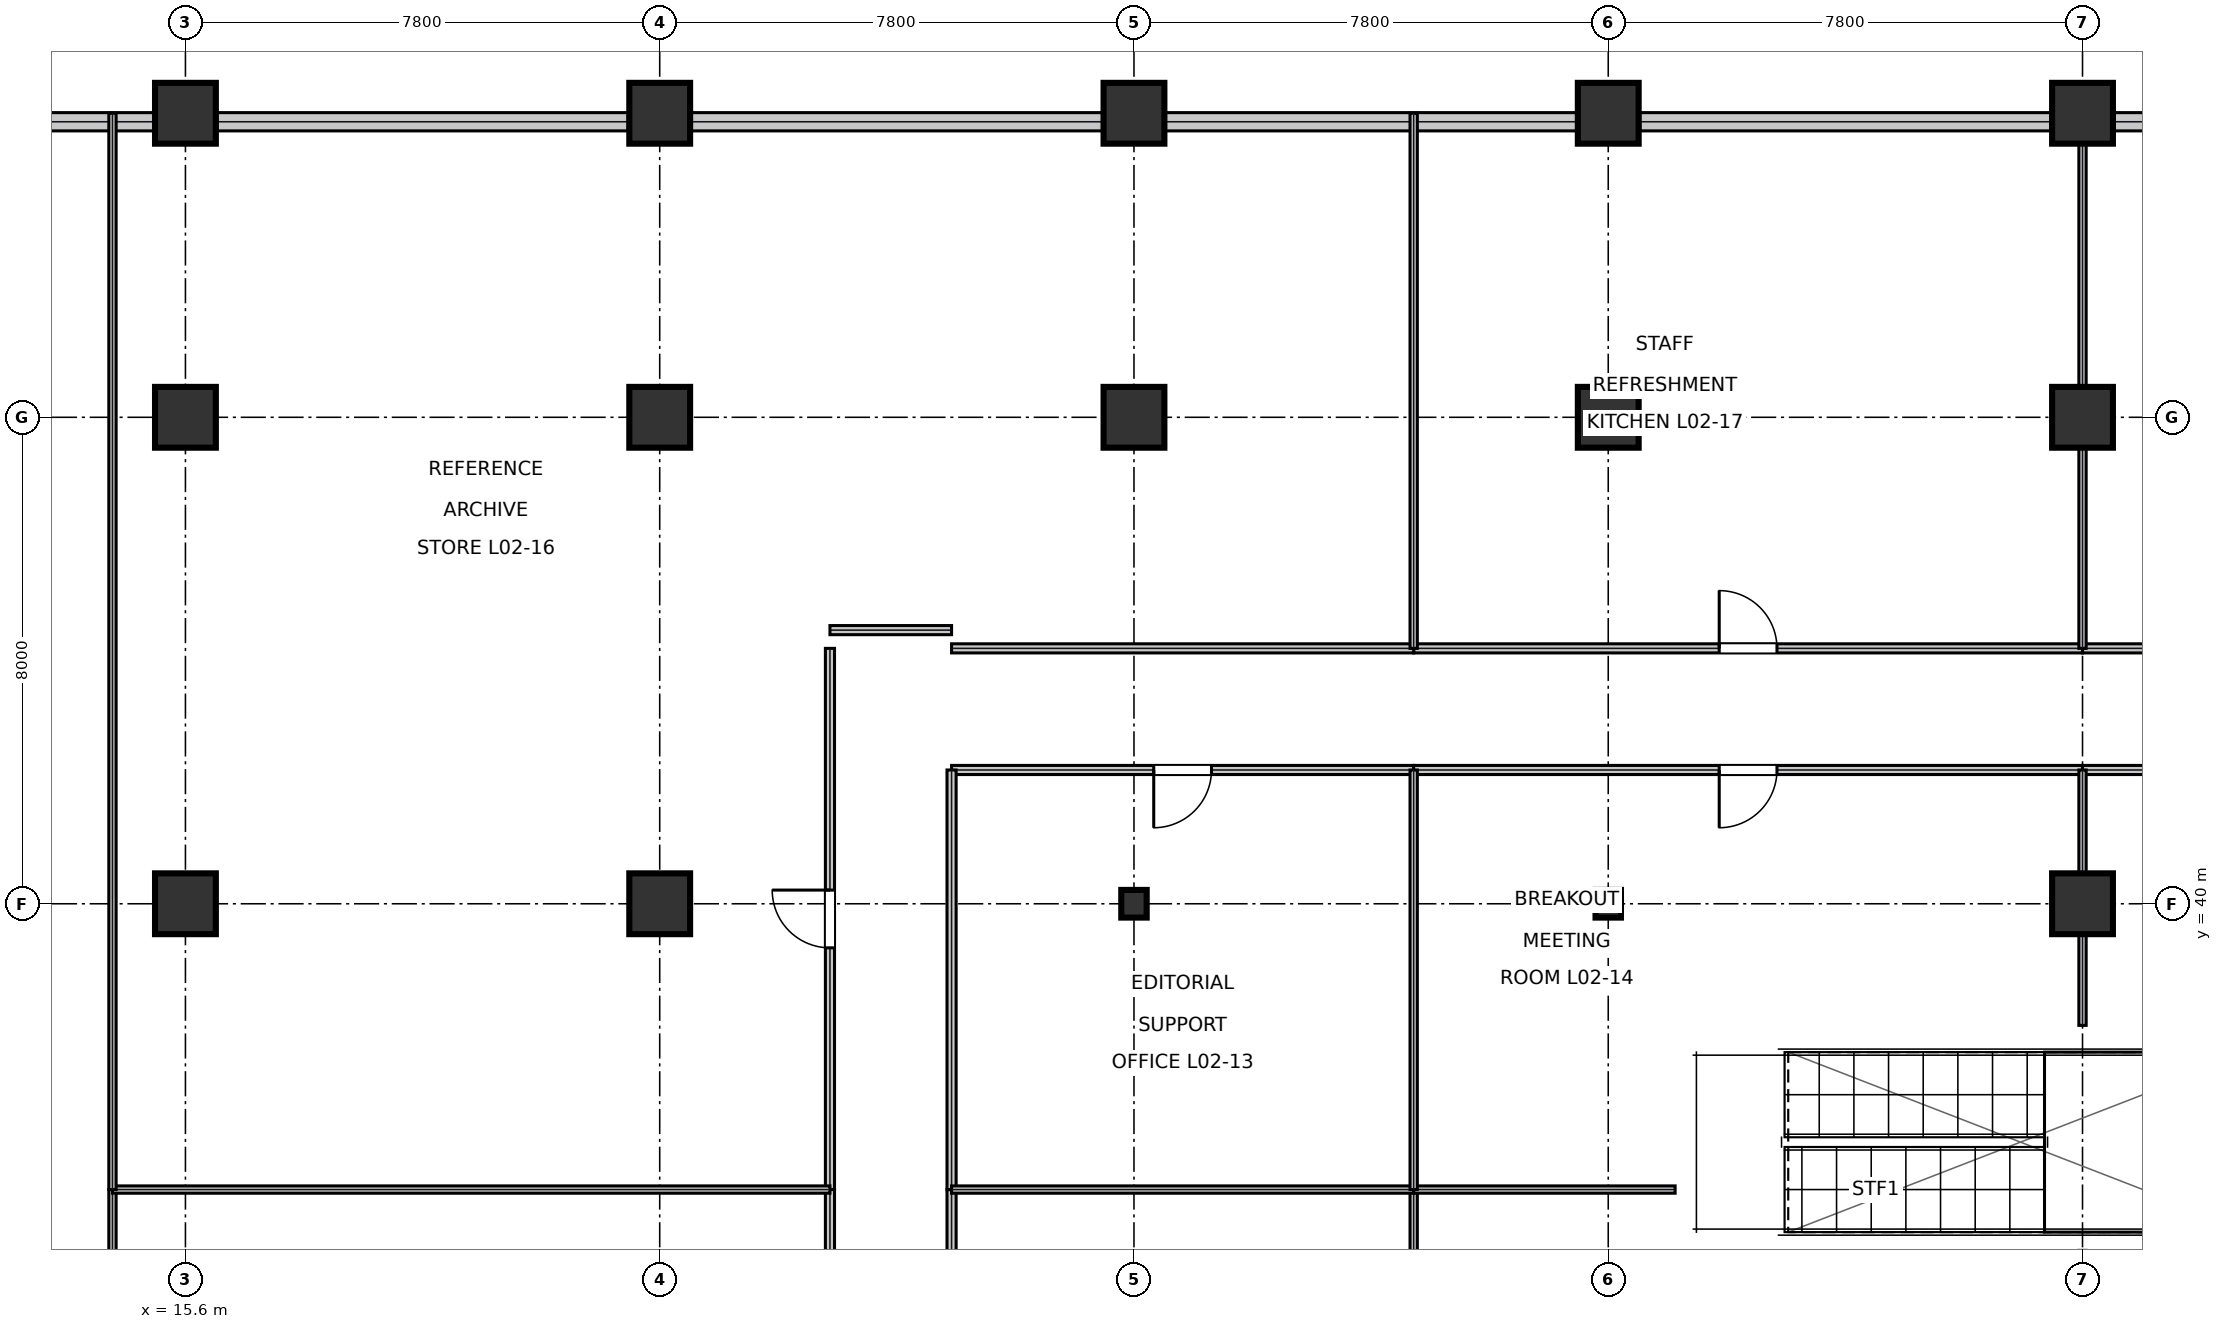
"""IFC4 building model, lengths in metres.
Left out: names, types, materials, properties, quantities, classifications, styles, units other than length and angle.
Written with IfcOpenShell. Run it as: python <this file> out.ifc"""

import sys

from ifc_helpers import new_model, si_unit, direction, frame, frame_2d, origin, origin_2d, place, context, subcontext, project, spatial, rectangle, i_section, extrude, element, fill, save


model = new_model("IFC4")
c1 = context("Model", 3, precision=1e-05, world=origin(), true_north=direction((0.0, 1.0)))
c2 = subcontext(c1, "Body", "Model", "MODEL_VIEW")
j1 = project(units=[si_unit("LENGTHUNIT", "METRE"), si_unit("PLANEANGLEUNIT", "RADIAN")], contexts=[c1])
p1 = place(None, origin())
s1 = spatial("IfcSite", under=j1, at=p1, CompositionType="ELEMENT")
p2 = place(p1, origin())
s2 = spatial("IfcBuilding", under=s1, at=p2, CompositionType="ELEMENT")
p3 = place(p2, frame((0.0, 0.0, 10.8)))
s3 = spatial("IfcBuildingStorey", under=s2, at=p3, CompositionType="ELEMENT", Elevation=10.8)
for number, where, z_axis, x_axis in (
    (1, (15.6, 40.0, 0.0), (0.0, 0.0, 1.0), (1.0, 0.0, 0.0)),
    (2, (15.6, 48.0, 0.0), (0.0, 0.0, 1.0), (1.0, 0.0, 0.0)),
    (3, (15.6, 53.0, 0.0), (0.0, 0.0, 1.0), (1.0, 0.0, 0.0)),
    (4, (23.4, 40.0, 0.0), (0.0, 0.0, 1.0), (1.0, 0.0, 0.0)),
    (5, (23.4, 48.0, 0.0), (0.0, 0.0, 1.0), (1.0, 0.0, 0.0)),
    (6, (23.4, 53.0, 0.0), (0.0, 0.0, 1.0), (1.0, 0.0, 0.0)),
):
    element("IfcColumn", number, at=place(p3, frame(where, z_axis=z_axis, x_axis=x_axis)), inside=s3, PredefinedType="COLUMN", context=c2, shape_type="SweptSolid", body=[
        extrude(rectangle(XDim=1.0, YDim=1.0, at=origin_2d()), origin(), (0.0, 0.0, 1.0), 5.395),
    ])
p4 = place(p3, frame((31.2, 40.0, 0.0), z_axis=(0.0, 0.0, 1.0), x_axis=(1.0, 0.0, 0.0)))
e7 = element("IfcColumn", 7, at=p4, inside=s3, PredefinedType="COLUMN", context=c2, shape_type="SweptSolid", body=[
    extrude(i_section(OverallWidth=0.418, OverallDepth=0.455, WebThickness=0.042, FlangeThickness=0.068, at=origin_2d()), origin(), (0.0, 0.0, 1.0), 5.395),
])
for number, where, z_axis, x_axis in (
    (8, (31.2, 48.0, 0.0), (0.0, 0.0, 1.0), (1.0, 0.0, 0.0)),
    (9, (31.2, 53.0, 0.0), (0.0, 0.0, 1.0), (1.0, 0.0, 0.0)),
):
    element("IfcColumn", number, at=place(p3, frame(where, z_axis=z_axis, x_axis=x_axis)), inside=s3, PredefinedType="COLUMN", context=c2, shape_type="SweptSolid", body=[
        extrude(rectangle(XDim=1.0, YDim=1.0, at=origin_2d()), origin(), (0.0, 0.0, 1.0), 5.395),
    ])
p5 = place(p3, frame((39.0, 40.0, 0.0), z_axis=(0.0, 0.0, 1.0), x_axis=(1.0, 0.0, 0.0)))
e10 = element("IfcColumn", 10, at=p5, inside=s3, PredefinedType="COLUMN", context=c2, shape_type="SweptSolid", body=[
    extrude(i_section(OverallWidth=0.418, OverallDepth=0.455, WebThickness=0.042, FlangeThickness=0.068, at=origin_2d()), origin(), (0.0, 0.0, 1.0), 5.395),
])
for number, where, z_axis, x_axis in (
    (11, (39.0, 48.0, 0.0), (0.0, 0.0, 1.0), (1.0, 0.0, 0.0)),
    (12, (39.0, 53.0, 0.0), (0.0, 0.0, 1.0), (1.0, 0.0, 0.0)),
    (13, (46.8, 40.0, 0.0), (0.0, 0.0, 1.0), (1.0, 0.0, 0.0)),
    (14, (46.8, 48.0, 0.0), (0.0, 0.0, 1.0), (1.0, 0.0, 0.0)),
    (15, (46.8, 53.0, 0.0), (0.0, 0.0, 1.0), (1.0, 0.0, 0.0)),
):
    element("IfcColumn", number, at=place(p3, frame(where, z_axis=z_axis, x_axis=x_axis)), inside=s3, PredefinedType="COLUMN", context=c2, shape_type="SweptSolid", body=[
        extrude(rectangle(XDim=1.0, YDim=1.0, at=origin_2d()), origin(), (0.0, 0.0, 1.0), 5.395),
    ])
for number, where, z_axis, x_axis in (
    (16, (54.082, 52.86, 0.0), (0.0, 0.0, 1.0), (-1.0, 0.0, 0.0)),
    (17, (46.282, 52.86, 0.0), (0.0, 0.0, 1.0), (-1.0, 0.0, 0.0)),
    (18, (38.482, 52.86, 0.0), (0.0, 0.0, 1.0), (-1.0, 0.0, 0.0)),
    (19, (30.682, 52.86, 0.0), (0.0, 0.0, 1.0), (-1.0, 0.0, 0.0)),
):
    element("IfcWall", number, at=place(p3, frame(where, z_axis=z_axis, x_axis=x_axis)), inside=s3, PredefinedType="STANDARD", context=c2, shape_type="SweptSolid", body=[
        extrude(rectangle(XDim=6.764, YDim=0.3, at=frame_2d((3.382, 0.0))), origin(), (0.0, 0.0, 1.0), 4.648),
    ])
p6 = place(p3, frame((22.882, 52.86, 0.0), z_axis=(0.0, 0.0, 1.0), x_axis=(-1.0, 0.0, 0.0)))
e20 = element("IfcWall", 20, at=p6, inside=s3, PredefinedType="STANDARD", context=c2, shape_type="SweptSolid", body=[
    extrude(rectangle(XDim=6.764, YDim=0.3, at=frame_2d((3.382, 0.0))), origin(), (0.0, 0.0, 1.0), 4.648),
])
p7 = place(p3, frame((15.082, 52.86, 0.0), z_axis=(0.0, 0.0, 1.0), x_axis=(-1.0, 0.0, 0.0)))
e21 = element("IfcWall", 21, at=p7, inside=s3, PredefinedType="STANDARD", context=c2, shape_type="SweptSolid", body=[
    extrude(rectangle(XDim=6.764, YDim=0.3, at=frame_2d((3.382, 0.0))), origin(), (0.0, 0.0, 1.0), 4.648),
])
p8 = place(p3, frame((28.2, 42.2, 0.0), z_axis=(0.0, 0.0, 1.0), x_axis=(1.0, 0.0, 0.0)))
e22 = element("IfcWall", 22, at=p8, inside=s3, PredefinedType="PARTITIONING", context=c2, shape_type="SweptSolid", body=[
    extrude(rectangle(XDim=7.6, YDim=0.15, at=frame_2d((3.8, 0.0))), origin(), (0.0, 0.0, 1.0), 4.415),
])
p9 = place(p8, frame((3.325, 0.0, 0.0)))
e23 = element("IfcOpeningElement", 23, at=p9, cuts=e22, PredefinedType="OPENING", context=c2, shape_type="SweptSolid", body=[
    extrude(rectangle(XDim=0.95, YDim=2.15, at=frame_2d((0.475, 1.075))), frame((0.0, 0.085, 0.0), z_axis=(0.0, -1.0, 0.0), x_axis=(1.0, 0.0, 0.0)), (0.0, 0.0, 1.0), 0.17),
])
p10 = place(p3, frame((35.8, 42.2, 0.0), z_axis=(0.0, 0.0, 1.0), x_axis=(1.0, 0.0, 0.0)))
e24 = element("IfcWall", 24, at=p10, inside=s3, PredefinedType="PARTITIONING", context=c2, shape_type="SweptSolid", body=[
    extrude(rectangle(XDim=11.0, YDim=0.15, at=frame_2d((5.5, 0.0))), origin(), (0.0, 0.0, 1.0), 4.415),
])
p11 = place(p10, frame((5.025, 0.0, 0.0)))
e25 = element("IfcOpeningElement", 25, at=p11, cuts=e24, PredefinedType="OPENING", context=c2, shape_type="SweptSolid", body=[
    extrude(rectangle(XDim=0.95, YDim=2.15, at=frame_2d((0.475, 1.075))), frame((0.0, 0.085, 0.0), z_axis=(0.0, -1.0, 0.0), x_axis=(1.0, 0.0, 0.0)), (0.0, 0.0, 1.0), 0.17),
])
p12 = place(p3, frame((46.8, 44.2, 0.0), z_axis=(0.0, 0.0, 1.0), x_axis=(1.0, 0.0, 0.0)))
e26 = element("IfcWall", 26, at=p12, inside=s3, PredefinedType="PARTITIONING", context=c2, shape_type="SweptSolid", body=[
    extrude(rectangle(XDim=5.7, YDim=0.15, at=frame_2d((2.85, 0.0))), origin(), (0.0, 0.0, 1.0), 4.415),
])
p13 = place(p12, frame((2.375, 0.0, 0.0)))
e27 = element("IfcOpeningElement", 27, at=p13, cuts=e26, PredefinedType="OPENING", context=c2, shape_type="SweptSolid", body=[
    extrude(rectangle(XDim=0.95, YDim=2.15, at=frame_2d((0.475, 1.075))), frame((0.0, 0.085, 0.0), z_axis=(0.0, -1.0, 0.0), x_axis=(1.0, 0.0, 0.0)), (0.0, 0.0, 1.0), 0.17),
])
p14 = place(p3, frame((26.2, 35.3, 0.0), z_axis=(0.0, 0.0, 1.0), x_axis=(0.0, 1.0, 0.0)))
e28 = element("IfcWall", 28, at=p14, inside=s3, PredefinedType="PARTITIONING", context=c2, shape_type="SweptSolid", body=[
    extrude(rectangle(XDim=8.9, YDim=0.15, at=frame_2d((4.45, 0.0))), origin(), (0.0, 0.0, 1.0), 4.338),
])
p15 = place(p14, frame((3.975, 0.0, 0.0)))
e29 = element("IfcOpeningElement", 29, at=p15, cuts=e28, PredefinedType="OPENING", context=c2, shape_type="SweptSolid", body=[
    extrude(rectangle(XDim=0.95, YDim=2.15, at=frame_2d((0.475, 1.075))), frame((0.0, 0.085, 0.0), z_axis=(0.0, -1.0, 0.0), x_axis=(1.0, 0.0, 0.0)), (0.0, 0.0, 1.0), 0.17),
])
p16 = place(p3, frame((35.8, 44.2, 0.0), z_axis=(0.0, 0.0, 1.0), x_axis=(1.0, 0.0, 0.0)))
e30 = element("IfcWall", 30, at=p16, inside=s3, PredefinedType="PARTITIONING", context=c2, shape_type="SweptSolid", body=[
    extrude(rectangle(XDim=11.0, YDim=0.15, at=frame_2d((5.5, 0.0))), origin(), (0.0, 0.0, 1.0), 4.415),
])
p17 = place(p16, frame((5.025, 0.0, 0.0)))
e31 = element("IfcOpeningElement", 31, at=p17, cuts=e30, PredefinedType="OPENING", context=c2, shape_type="SweptSolid", body=[
    extrude(rectangle(XDim=0.95, YDim=2.15, at=frame_2d((0.475, 1.075))), frame((0.0, 0.085, 0.0), z_axis=(0.0, -1.0, 0.0), x_axis=(1.0, 0.0, 0.0)), (0.0, 0.0, 1.0), 0.17),
])
for number, where, z_axis, x_axis in (
    (32, (26.2, 28.2, 0.0), (0.0, 0.0, 1.0), (0.0, 1.0, 0.0)),
    (33, (28.2, 28.2, 0.0), (0.0, 0.0, 1.0), (0.0, 1.0, 0.0)),
):
    element("IfcWall", number, at=place(p3, frame(where, z_axis=z_axis, x_axis=x_axis)), inside=s3, PredefinedType="PARTITIONING", context=c2, shape_type="SweptSolid", body=[
        extrude(rectangle(XDim=7.1, YDim=0.15, at=frame_2d((3.55, 0.0))), origin(), (0.0, 0.0, 1.0), 4.338),
    ])
p18 = place(p3, frame((28.2, 35.3, 0.0), z_axis=(0.0, 0.0, 1.0), x_axis=(0.0, 1.0, 0.0)))
e34 = element("IfcWall", 34, at=p18, inside=s3, PredefinedType="PARTITIONING", context=c2, shape_type="SweptSolid", body=[
    extrude(rectangle(XDim=6.9, YDim=0.15, at=frame_2d((3.45, 0.0))), origin(), (0.0, 0.0, 1.0), 4.338),
])
p19 = place(p3, frame((46.8, 42.2, 0.0), z_axis=(0.0, 0.0, 1.0), x_axis=(1.0, 0.0, 0.0)))
e35 = element("IfcWall", 35, at=p19, inside=s3, PredefinedType="PARTITIONING", context=c2, shape_type="SweptSolid", body=[
    extrude(rectangle(XDim=5.7, YDim=0.15, at=frame_2d((2.85, 0.0))), origin(), (0.0, 0.0, 1.0), 4.415),
])
p20 = place(p3, frame((28.2, 44.2, 0.0), z_axis=(0.0, 0.0, 1.0), x_axis=(1.0, 0.0, 0.0)))
e36 = element("IfcWall", 36, at=p20, inside=s3, PredefinedType="PARTITIONING", context=c2, shape_type="SweptSolid", body=[
    extrude(rectangle(XDim=7.6, YDim=0.15, at=frame_2d((3.8, 0.0))), origin(), (0.0, 0.0, 1.0), 4.415),
])
p21 = place(p3, frame((26.2, 44.5, 0.0), z_axis=(0.0, 0.0, 1.0), x_axis=(1.0, 0.0, 0.0)))
e37 = element("IfcWall", 37, at=p21, inside=s3, PredefinedType="PARTITIONING", context=c2, shape_type="SweptSolid", body=[
    extrude(rectangle(XDim=2.0, YDim=0.15, at=frame_2d((1.0, 0.0))), origin(), (0.0, 0.0, 1.0), 4.701),
])
p22 = place(p3, frame((14.4, 28.2, 0.0), z_axis=(0.0, 0.0, 1.0), x_axis=(0.0, 1.0, 0.0)))
e38 = element("IfcWall", 38, at=p22, inside=s3, PredefinedType="PARTITIONING", context=c2, shape_type="SweptSolid", body=[
    extrude(rectangle(XDim=7.1, YDim=0.12, at=frame_2d((3.55, 0.0))), origin(), (0.0, 0.0, 1.0), 3.688),
])
p23 = place(p3, frame((14.4, 35.3, 0.0), z_axis=(0.0, 0.0, 1.0), x_axis=(1.0, 0.0, 0.0)))
e39 = element("IfcWall", 39, at=p23, inside=s3, PredefinedType="PARTITIONING", context=c2, shape_type="SweptSolid", body=[
    extrude(rectangle(XDim=11.8, YDim=0.12, at=frame_2d((5.9, 0.0))), origin(), (0.0, 0.0, 1.0), 3.688),
])
p24 = place(p3, frame((35.8, 28.2, 0.0), z_axis=(0.0, 0.0, 1.0), x_axis=(0.0, 1.0, 0.0)))
e40 = element("IfcWall", 40, at=p24, inside=s3, PredefinedType="PARTITIONING", context=c2, shape_type="SweptSolid", body=[
    extrude(rectangle(XDim=7.1, YDim=0.12, at=frame_2d((3.55, 0.0))), origin(), (0.0, 0.0, 1.0), 4.338),
])
p25 = place(p3, frame((28.2, 35.3, 0.0), z_axis=(0.0, 0.0, 1.0), x_axis=(1.0, 0.0, 0.0)))
e41 = element("IfcWall", 41, at=p25, inside=s3, PredefinedType="PARTITIONING", context=c2, shape_type="SweptSolid", body=[
    extrude(rectangle(XDim=7.6, YDim=0.12, at=frame_2d((3.8, 0.0))), origin(), (0.0, 0.0, 1.0), 4.415),
])
p26 = place(p3, frame((35.8, 35.3, 0.0), z_axis=(0.0, 0.0, 1.0), x_axis=(1.0, 0.0, 0.0)))
e42 = element("IfcWall", 42, at=p26, inside=s3, PredefinedType="PARTITIONING", context=c2, shape_type="SweptSolid", body=[
    extrude(rectangle(XDim=4.3, YDim=0.12, at=frame_2d((2.15, 0.0))), origin(), (0.0, 0.0, 1.0), 4.415),
])
p27 = place(p3, frame((14.4, 35.3, 0.0), z_axis=(0.0, 0.0, 1.0), x_axis=(0.0, 1.0, 0.0)))
e43 = element("IfcWall", 43, at=p27, inside=s3, PredefinedType="PARTITIONING", context=c2, shape_type="SweptSolid", body=[
    extrude(rectangle(XDim=17.7, YDim=0.12, at=frame_2d((8.85, 0.0))), origin(), (0.0, 0.0, 1.0), 4.338),
])
p28 = place(p3, frame((35.8, 35.3, 0.0), z_axis=(0.0, 0.0, 1.0), x_axis=(0.0, 1.0, 0.0)))
e44 = element("IfcWall", 44, at=p28, inside=s3, PredefinedType="PARTITIONING", context=c2, shape_type="SweptSolid", body=[
    extrude(rectangle(XDim=6.9, YDim=0.12, at=frame_2d((3.45, 0.0))), origin(), (0.0, 0.0, 1.0), 4.338),
])
p29 = place(p3, frame((46.8, 38.0, 0.0), z_axis=(0.0, 0.0, 1.0), x_axis=(0.0, 1.0, 0.0)))
e45 = element("IfcWall", 45, at=p29, inside=s3, PredefinedType="PARTITIONING", context=c2, shape_type="SweptSolid", body=[
    extrude(rectangle(XDim=4.2, YDim=0.12, at=frame_2d((2.1, 0.0))), origin(), (0.0, 0.0, 1.0), 4.338),
])
for number, where, z_axis, x_axis in (
    (46, (46.8, 44.2, 0.0), (0.0, 0.0, 1.0), (0.0, 1.0, 0.0)),
    (47, (35.8, 44.2, 0.0), (0.0, 0.0, 1.0), (0.0, 1.0, 0.0)),
):
    element("IfcWall", number, at=place(p3, frame(where, z_axis=z_axis, x_axis=x_axis)), inside=s3, PredefinedType="PARTITIONING", context=c2, shape_type="SweptSolid", body=[
        extrude(rectangle(XDim=8.8, YDim=0.12, at=frame_2d((4.4, 0.0))), origin(), (0.0, 0.0, 1.0), 4.338),
    ])
p30 = place(p9, frame((0.95, 0.0, 0.0), z_axis=(0.0, 0.0, 1.0), x_axis=(-1.0, 0.0, 0.0)))
e48 = element("IfcDoor", 48, at=p30, inside=s3, OperationType="SINGLE_SWING_RIGHT", PredefinedType="DOOR", context=c2, shape_type="SweptSolid", body=[
    extrude(rectangle(XDim=0.95, YDim=2.15, at=frame_2d((0.475, 1.075))), frame((0.0, 0.025, 0.0), z_axis=(0.0, -1.0, 0.0), x_axis=(1.0, 0.0, 0.0)), (0.0, 0.0, 1.0), 0.05),
])
fill(e23, e48)
p31 = place(p11, frame((0.95, 0.0, 0.0), z_axis=(0.0, 0.0, 1.0), x_axis=(-1.0, 0.0, 0.0)))
e49 = element("IfcDoor", 49, at=p31, inside=s3, OperationType="SINGLE_SWING_RIGHT", PredefinedType="DOOR", context=c2, shape_type="SweptSolid", body=[
    extrude(rectangle(XDim=0.95, YDim=2.15, at=frame_2d((0.475, 1.075))), frame((0.0, 0.025, 0.0), z_axis=(0.0, -1.0, 0.0), x_axis=(1.0, 0.0, 0.0)), (0.0, 0.0, 1.0), 0.05),
])
fill(e25, e49)
p32 = place(p15, origin())
e50 = element("IfcDoor", 50, at=p32, inside=s3, OperationType="SINGLE_SWING_RIGHT", PredefinedType="DOOR", context=c2, shape_type="SweptSolid", body=[
    extrude(rectangle(XDim=0.95, YDim=2.15, at=frame_2d((0.475, 1.075))), frame((0.0, 0.025, 0.0), z_axis=(0.0, -1.0, 0.0), x_axis=(1.0, 0.0, 0.0)), (0.0, 0.0, 1.0), 0.05),
])
fill(e29, e50)
p33 = place(p17, origin())
e51 = element("IfcDoor", 51, at=p33, inside=s3, OperationType="SINGLE_SWING_LEFT", PredefinedType="DOOR", context=c2, shape_type="SweptSolid", body=[
    extrude(rectangle(XDim=0.95, YDim=2.15, at=frame_2d((0.475, 1.075))), frame((0.0, 0.025, 0.0), z_axis=(0.0, -1.0, 0.0), x_axis=(1.0, 0.0, 0.0)), (0.0, 0.0, 1.0), 0.05),
])
fill(e31, e51)
save(model, sys.argv[1])
